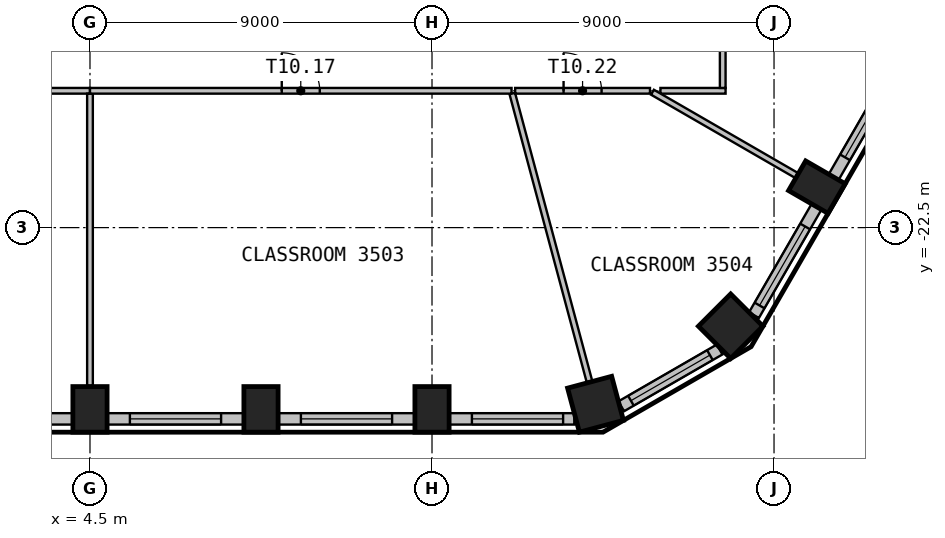
"""IFC4 building model, lengths in metres.
Left out: names, types, materials, properties, quantities, classifications, styles, units other than length and angle.
Written with IfcOpenShell. Run it as: python <this file> out.ifc"""

import sys

from ifc_helpers import new_model, si_unit, direction, frame, frame_2d, origin, origin_2d, place, context, subcontext, project, spatial, rectangle, extrude, element, fill, save


model = new_model("IFC4")
c1 = context("Model", 3, precision=1e-05, world=origin(), true_north=direction((0.0, 1.0)))
c2 = subcontext(c1, "Body", "Model", "MODEL_VIEW")
j1 = project(units=[si_unit("LENGTHUNIT", "METRE"), si_unit("PLANEANGLEUNIT", "RADIAN")], contexts=[c1])
p1 = place(None, origin())
s1 = spatial("IfcSite", under=j1, at=p1, CompositionType="ELEMENT")
p2 = place(p1, origin())
s2 = spatial("IfcBuilding", under=s1, at=p2, CompositionType="ELEMENT")
p3 = place(p2, frame((0.0, 0.0, 144.3)))
s3 = spatial("IfcBuildingStorey", under=s2, at=p3, CompositionType="ELEMENT", Elevation=144.3)
for number, where, z_axis, x_axis in (
    (1, (4.5, -27.283, 0.0), (0.0, 0.0, 1.0), (1.0, 0.0, 0.0)),
    (2, (9.0, -27.283, 0.0), (0.0, 0.0, 1.0), (1.0, 0.0, 0.0)),
    (3, (13.5, -27.283, 0.0), (0.0, 0.0, 1.0), (1.0, 0.0, 0.0)),
):
    element("IfcColumn", number, at=place(p3, frame(where, z_axis=z_axis, x_axis=x_axis)), inside=s3, PredefinedType="COLUMN", context=c2, shape_type="SweptSolid", body=[
        extrude(rectangle(XDim=0.9, YDim=1.2, at=origin_2d()), origin(), (0.0, 0.0, 1.0), 3.575),
    ])
for number, where, z_axis, x_axis in (
    (4, (17.803, -27.148, 0.0), (0.0, 0.0, 1.0), (0.966, 0.259, 0.0)),
    (5, (21.359, -25.095, 0.0), (0.0, 0.0, 1.0), (0.707, 0.707, 0.0)),
):
    element("IfcColumn", number, at=place(p3, frame(where, z_axis=z_axis, x_axis=x_axis)), inside=s3, PredefinedType="COLUMN", context=c2, shape_type="SweptSolid", body=[
        extrude(rectangle(XDim=1.2, YDim=1.2, at=origin_2d()), origin(), (0.0, 0.0, 1.0), 3.575),
    ])
p4 = place(p3, frame((23.627, -21.436, 0.0), z_axis=(0.0, 0.0, 1.0), x_axis=(0.5, 0.866025403784, 0.0)))
e6 = element("IfcColumn", 6, at=p4, inside=s3, PredefinedType="COLUMN", context=c2, shape_type="SweptSolid", body=[
    extrude(rectangle(XDim=0.9, YDim=1.2, at=origin_2d()), origin(), (0.0, 0.0, 1.0), 3.575),
])
p5 = place(p3, frame((0.45, -27.533, 0.0), z_axis=(0.0, 0.0, 1.0), x_axis=(1.0, 0.0, 0.0)))
e7 = element("IfcWall", 7, at=p5, inside=s3, PredefinedType="SOLIDWALL", context=c2, shape_type="SweptSolid", body=[
    extrude(rectangle(XDim=3.599, YDim=0.3, at=frame_2d((1.8, 0.0))), origin(), (0.0, 0.0, 1.0), 3.575),
])
p6 = place(p5, frame((0.6, 0.0, 0.9)))
e8 = element("IfcOpeningElement", 8, at=p6, cuts=e7, PredefinedType="OPENING", context=c2, shape_type="SweptSolid", body=[
    extrude(rectangle(XDim=2.4, YDim=2.1, at=frame_2d((1.2, 1.05))), frame((0.0, 0.16, 0.0), z_axis=(0.0, -1.0, 0.0), x_axis=(1.0, 0.0, 0.0)), (0.0, 0.0, 1.0), 0.32),
])
p7 = place(p3, frame((4.95, -27.533, 0.0), z_axis=(0.0, 0.0, 1.0), x_axis=(1.0, 0.0, 0.0)))
e9 = element("IfcWall", 9, at=p7, inside=s3, PredefinedType="SOLIDWALL", context=c2, shape_type="SweptSolid", body=[
    extrude(rectangle(XDim=3.599, YDim=0.3, at=frame_2d((1.8, 0.0))), origin(), (0.0, 0.0, 1.0), 3.575),
])
p8 = place(p7, frame((0.6, 0.0, 0.9)))
e10 = element("IfcOpeningElement", 10, at=p8, cuts=e9, PredefinedType="OPENING", context=c2, shape_type="SweptSolid", body=[
    extrude(rectangle(XDim=2.4, YDim=2.1, at=frame_2d((1.2, 1.05))), frame((0.0, 0.16, 0.0), z_axis=(0.0, -1.0, 0.0), x_axis=(1.0, 0.0, 0.0)), (0.0, 0.0, 1.0), 0.32),
])
p9 = place(p3, frame((9.45, -27.533, 0.0), z_axis=(0.0, 0.0, 1.0), x_axis=(1.0, 0.0, 0.0)))
e11 = element("IfcWall", 11, at=p9, inside=s3, PredefinedType="SOLIDWALL", context=c2, shape_type="SweptSolid", body=[
    extrude(rectangle(XDim=3.599, YDim=0.3, at=frame_2d((1.8, 0.0))), origin(), (0.0, 0.0, 1.0), 3.575),
])
p10 = place(p9, frame((0.6, 0.0, 0.9)))
e12 = element("IfcOpeningElement", 12, at=p10, cuts=e11, PredefinedType="OPENING", context=c2, shape_type="SweptSolid", body=[
    extrude(rectangle(XDim=2.4, YDim=2.1, at=frame_2d((1.2, 1.05))), frame((0.0, 0.16, 0.0), z_axis=(0.0, -1.0, 0.0), x_axis=(1.0, 0.0, 0.0)), (0.0, 0.0, 1.0), 0.32),
])
p11 = place(p3, frame((13.95, -27.533, 0.0), z_axis=(0.0, 0.0, 1.0), x_axis=(1.0, 0.0, 0.0)))
e13 = element("IfcWall", 13, at=p11, inside=s3, PredefinedType="SOLIDWALL", context=c2, shape_type="SweptSolid", body=[
    extrude(rectangle(XDim=3.294, YDim=0.3, at=frame_2d((1.647, 0.0))), origin(), (0.0, 0.0, 1.0), 3.575),
])
p12 = place(p11, frame((0.6, 0.0, 0.9)))
e14 = element("IfcOpeningElement", 14, at=p12, cuts=e13, PredefinedType="OPENING", context=c2, shape_type="SweptSolid", body=[
    extrude(rectangle(XDim=2.4, YDim=2.1, at=frame_2d((1.2, 1.05))), frame((0.0, 0.16, 0.0), z_axis=(0.0, -1.0, 0.0), x_axis=(1.0, 0.0, 0.0)), (0.0, 0.0, 1.0), 0.32),
])
p13 = place(p3, frame((18.479, -27.202, 0.0), z_axis=(0.0, 0.0, 1.0), x_axis=(0.866012844897, 0.500021752, 0.0)))
e15 = element("IfcWall", 15, at=p13, inside=s3, PredefinedType="SOLIDWALL", context=c2, shape_type="SweptSolid", body=[
    extrude(rectangle(XDim=2.989, YDim=0.3, at=frame_2d((1.495, 0.0))), origin(), (0.0, 0.0, 1.0), 3.575),
])
p14 = place(p13, frame((0.295, 0.0, 0.9)))
e16 = element("IfcOpeningElement", 16, at=p14, cuts=e15, PredefinedType="OPENING", context=c2, shape_type="SweptSolid", body=[
    extrude(rectangle(XDim=2.4, YDim=2.1, at=frame_2d((1.2, 1.05))), frame((0.0, 0.16, 0.0), z_axis=(0.0, -1.0, 0.0), x_axis=(1.0, 0.0, 0.0)), (0.0, 0.0, 1.0), 0.32),
])
p15 = place(p3, frame((21.972, -24.803, 0.0), z_axis=(0.0, 0.0, 1.0), x_axis=(0.500036802197, 0.866004154983, 0.0)))
e17 = element("IfcWall", 17, at=p15, inside=s3, PredefinedType="SOLIDWALL", context=c2, shape_type="SweptSolid", body=[
    extrude(rectangle(XDim=3.294, YDim=0.3, at=frame_2d((1.647, 0.0))), origin(), (0.0, 0.0, 1.0), 3.575),
])
p16 = place(p15, frame((0.294, 0.0, 0.9)))
e18 = element("IfcOpeningElement", 18, at=p16, cuts=e17, PredefinedType="OPENING", context=c2, shape_type="SweptSolid", body=[
    extrude(rectangle(XDim=2.4, YDim=2.1, at=frame_2d((1.2, 1.05))), frame((0.0, 0.16, 0.0), z_axis=(0.0, -1.0, 0.0), x_axis=(1.0, 0.0, 0.0)), (0.0, 0.0, 1.0), 0.32),
])
p17 = place(p3, frame((24.069, -21.17, 0.0), z_axis=(0.0, 0.0, 1.0), x_axis=(0.500027802648, 0.866009351323, 0.0)))
e19 = element("IfcWall", 19, at=p17, inside=s3, PredefinedType="SOLIDWALL", context=c2, shape_type="SweptSolid", body=[
    extrude(rectangle(XDim=3.599, YDim=0.3, at=frame_2d((1.799, 0.0))), origin(), (0.0, 0.0, 1.0), 3.575),
])
p18 = place(p17, frame((0.6, 0.0, 0.9)))
e20 = element("IfcOpeningElement", 20, at=p18, cuts=e19, PredefinedType="OPENING", context=c2, shape_type="SweptSolid", body=[
    extrude(rectangle(XDim=2.4, YDim=2.1, at=frame_2d((1.2, 1.05))), frame((0.0, 0.16, 0.0), z_axis=(0.0, -1.0, 0.0), x_axis=(1.0, 0.0, 0.0)), (0.0, 0.0, 1.0), 0.32),
])
p19 = place(p3, frame((-13.5, -18.9, 0.0), z_axis=(0.0, 0.0, 1.0), x_axis=(1.0, 0.0, 0.0)))
e21 = element("IfcWall", 21, at=p19, inside=s3, PredefinedType="PARTITIONING", context=c2, shape_type="SweptSolid", body=[
    extrude(rectangle(XDim=18.0, YDim=0.15, at=frame_2d((9.0, 0.0))), origin(), (0.0, 0.0, 1.0), 3.575),
])
p20 = place(p19, frame((8.5, 0.0, 0.0)))
e22 = element("IfcOpeningElement", 22, at=p20, cuts=e21, PredefinedType="OPENING", context=c2, shape_type="SweptSolid", body=[
    extrude(rectangle(XDim=1.0, YDim=2.1, at=frame_2d((0.5, 1.05))), frame((0.0, 0.085, 0.0), z_axis=(0.0, -1.0, 0.0), x_axis=(1.0, 0.0, 0.0)), (0.0, 0.0, 1.0), 0.17),
])
p21 = place(p3, frame((4.5, -18.975, 0.0), z_axis=(0.0, 0.0, 1.0), x_axis=(0.0, -1.0, 0.0)))
e23 = element("IfcWall", 23, at=p21, inside=s3, PredefinedType="PARTITIONING", context=c2, shape_type="SweptSolid", body=[
    extrude(rectangle(XDim=7.688, YDim=0.15, at=frame_2d((3.844, 0.0))), origin(), (0.0, 0.0, 1.0), 3.575),
])
p22 = place(p3, frame((4.5, -18.9, 0.0), z_axis=(0.0, 0.0, 1.0), x_axis=(1.0, 0.0, 0.0)))
e24 = element("IfcWall", 24, at=p22, inside=s3, PredefinedType="PARTITIONING", context=c2, shape_type="SweptSolid", body=[
    extrude(rectangle(XDim=11.093, YDim=0.15, at=frame_2d((5.546, 0.0))), origin(), (0.0, 0.0, 1.0), 3.575),
])
p23 = place(p22, frame((5.046, 0.0, 0.0)))
e25 = element("IfcOpeningElement", 25, at=p23, cuts=e24, PredefinedType="OPENING", context=c2, shape_type="SweptSolid", body=[
    extrude(rectangle(XDim=1.0, YDim=2.1, at=frame_2d((0.5, 1.05))), frame((0.0, 0.085, 0.0), z_axis=(0.0, -1.0, 0.0), x_axis=(1.0, 0.0, 0.0)), (0.0, 0.0, 1.0), 0.17),
])
p24 = place(p3, frame((15.612, -18.972, 0.0), z_axis=(0.0, 0.0, 1.0), x_axis=(0.258869363255, -0.965912342176, 0.0)))
e26 = element("IfcWall", 26, at=p24, inside=s3, PredefinedType="MOVABLE", context=c2, shape_type="SweptSolid", body=[
    extrude(rectangle(XDim=7.844, YDim=0.15, at=frame_2d((3.922, 0.0))), origin(), (0.0, 0.0, 1.0), 3.575),
])
p25 = place(p3, frame((15.688, -18.9, 0.0), z_axis=(0.0, 0.0, 1.0), x_axis=(1.0, 0.0, 0.0)))
e27 = element("IfcWall", 27, at=p25, inside=s3, PredefinedType="PARTITIONING", context=c2, shape_type="SweptSolid", body=[
    extrude(rectangle(XDim=3.548, YDim=0.15, at=frame_2d((1.774, 0.0))), origin(), (0.0, 0.0, 1.0), 3.575),
])
p26 = place(p25, frame((1.274, 0.0, 0.0)))
e28 = element("IfcOpeningElement", 28, at=p26, cuts=e27, PredefinedType="OPENING", context=c2, shape_type="SweptSolid", body=[
    extrude(rectangle(XDim=1.0, YDim=2.1, at=frame_2d((0.5, 1.05))), frame((0.0, 0.085, 0.0), z_axis=(0.0, -1.0, 0.0), x_axis=(1.0, 0.0, 0.0)), (0.0, 0.0, 1.0), 0.17),
])
p27 = place(p3, frame((19.511, -18.9, 0.0), z_axis=(0.0, 0.0, 1.0), x_axis=(1.0, 0.0, 0.0)))
e29 = element("IfcWall", 29, at=p27, inside=s3, PredefinedType="PARTITIONING", context=c2, shape_type="SweptSolid", body=[
    extrude(rectangle(XDim=1.714, YDim=0.15, at=frame_2d((0.857, 0.0))), origin(), (0.0, 0.0, 1.0), 3.575),
])
p28 = place(p3, frame((19.301, -18.938, 0.0), z_axis=(0.0, 0.0, 1.0), x_axis=(0.865968165673, -0.500099126214, 0.0)))
e30 = element("IfcWall", 30, at=p28, inside=s3, PredefinedType="PARTITIONING", context=c2, shape_type="SweptSolid", body=[
    extrude(rectangle(XDim=4.376, YDim=0.15, at=frame_2d((2.188, 0.0))), origin(), (0.0, 0.0, 1.0), 3.575),
])
p29 = place(p3, frame((21.15, -18.825, 0.0), z_axis=(0.0, 0.0, 1.0), x_axis=(0.0, 1.0, 0.0)))
e31 = element("IfcWall", 31, at=p29, inside=s3, PredefinedType="PARTITIONING", context=c2, shape_type="SweptSolid", body=[
    extrude(rectangle(XDim=16.65, YDim=0.15, at=frame_2d((8.325, 0.0))), origin(), (0.0, 0.0, 1.0), 3.575),
])
p30 = place(p29, frame((7.825, 0.0, 0.0)))
e32 = element("IfcOpeningElement", 32, at=p30, cuts=e31, PredefinedType="OPENING", context=c2, shape_type="SweptSolid", body=[
    extrude(rectangle(XDim=1.0, YDim=2.1, at=frame_2d((0.5, 1.05))), frame((0.0, 0.085, 0.0), z_axis=(0.0, -1.0, 0.0), x_axis=(1.0, 0.0, 0.0)), (0.0, 0.0, 1.0), 0.17),
])
p31 = place(p8, origin())
e33 = element("IfcWindow", 33, at=p31, inside=s3, PartitioningType="SINGLE_PANEL", PredefinedType="WINDOW", context=c2, shape_type="SweptSolid", body=[
    extrude(rectangle(XDim=2.4, YDim=2.1, at=frame_2d((1.2, 1.05))), frame((0.0, 0.03, 0.0), z_axis=(0.0, -1.0, 0.0), x_axis=(1.0, 0.0, 0.0)), (0.0, 0.0, 1.0), 0.06),
])
fill(e10, e33)
p32 = place(p10, origin())
e34 = element("IfcWindow", 34, at=p32, inside=s3, PartitioningType="SINGLE_PANEL", PredefinedType="WINDOW", context=c2, shape_type="SweptSolid", body=[
    extrude(rectangle(XDim=2.4, YDim=2.1, at=frame_2d((1.2, 1.05))), frame((0.0, 0.03, 0.0), z_axis=(0.0, -1.0, 0.0), x_axis=(1.0, 0.0, 0.0)), (0.0, 0.0, 1.0), 0.06),
])
fill(e12, e34)
p33 = place(p12, origin())
e35 = element("IfcWindow", 35, at=p33, inside=s3, PartitioningType="SINGLE_PANEL", PredefinedType="WINDOW", context=c2, shape_type="SweptSolid", body=[
    extrude(rectangle(XDim=2.4, YDim=2.1, at=frame_2d((1.2, 1.05))), frame((0.0, 0.03, 0.0), z_axis=(0.0, -1.0, 0.0), x_axis=(1.0, 0.0, 0.0)), (0.0, 0.0, 1.0), 0.06),
])
fill(e14, e35)
p34 = place(p14, origin())
e36 = element("IfcWindow", 36, at=p34, inside=s3, PartitioningType="SINGLE_PANEL", PredefinedType="WINDOW", context=c2, shape_type="SweptSolid", body=[
    extrude(rectangle(XDim=2.4, YDim=2.1, at=frame_2d((1.2, 1.05))), frame((0.0, 0.03, 0.0), z_axis=(0.0, -1.0, 0.0), x_axis=(1.0, 0.0, 0.0)), (0.0, 0.0, 1.0), 0.06),
])
fill(e16, e36)
p35 = place(p16, origin())
e37 = element("IfcWindow", 37, at=p35, inside=s3, PartitioningType="SINGLE_PANEL", PredefinedType="WINDOW", context=c2, shape_type="SweptSolid", body=[
    extrude(rectangle(XDim=2.4, YDim=2.1, at=frame_2d((1.2, 1.05))), frame((0.0, 0.03, 0.0), z_axis=(0.0, -1.0, 0.0), x_axis=(1.0, 0.0, 0.0)), (0.0, 0.0, 1.0), 0.06),
])
fill(e18, e37)
p36 = place(p18, origin())
e38 = element("IfcWindow", 38, at=p36, inside=s3, PartitioningType="SINGLE_PANEL", PredefinedType="WINDOW", context=c2, shape_type="SweptSolid", body=[
    extrude(rectangle(XDim=2.4, YDim=2.1, at=frame_2d((1.2, 1.05))), frame((0.0, 0.03, 0.0), z_axis=(0.0, -1.0, 0.0), x_axis=(1.0, 0.0, 0.0)), (0.0, 0.0, 1.0), 0.06),
])
fill(e20, e38)
p37 = place(p23, origin())
e39 = element("IfcDoor", 39, at=p37, inside=s3, OperationType="SINGLE_SWING_LEFT", PredefinedType="DOOR", context=c2, shape_type="SweptSolid", body=[
    extrude(rectangle(XDim=1.0, YDim=2.1, at=frame_2d((0.5, 1.05))), frame((0.0, 0.025, 0.0), z_axis=(0.0, -1.0, 0.0), x_axis=(1.0, 0.0, 0.0)), (0.0, 0.0, 1.0), 0.05),
])
fill(e25, e39)
p38 = place(p26, origin())
e40 = element("IfcDoor", 40, at=p38, inside=s3, OperationType="SINGLE_SWING_LEFT", PredefinedType="DOOR", context=c2, shape_type="SweptSolid", body=[
    extrude(rectangle(XDim=1.0, YDim=2.1, at=frame_2d((0.5, 1.05))), frame((0.0, 0.025, 0.0), z_axis=(0.0, -1.0, 0.0), x_axis=(1.0, 0.0, 0.0)), (0.0, 0.0, 1.0), 0.05),
])
fill(e28, e40)
save(model, sys.argv[1])
